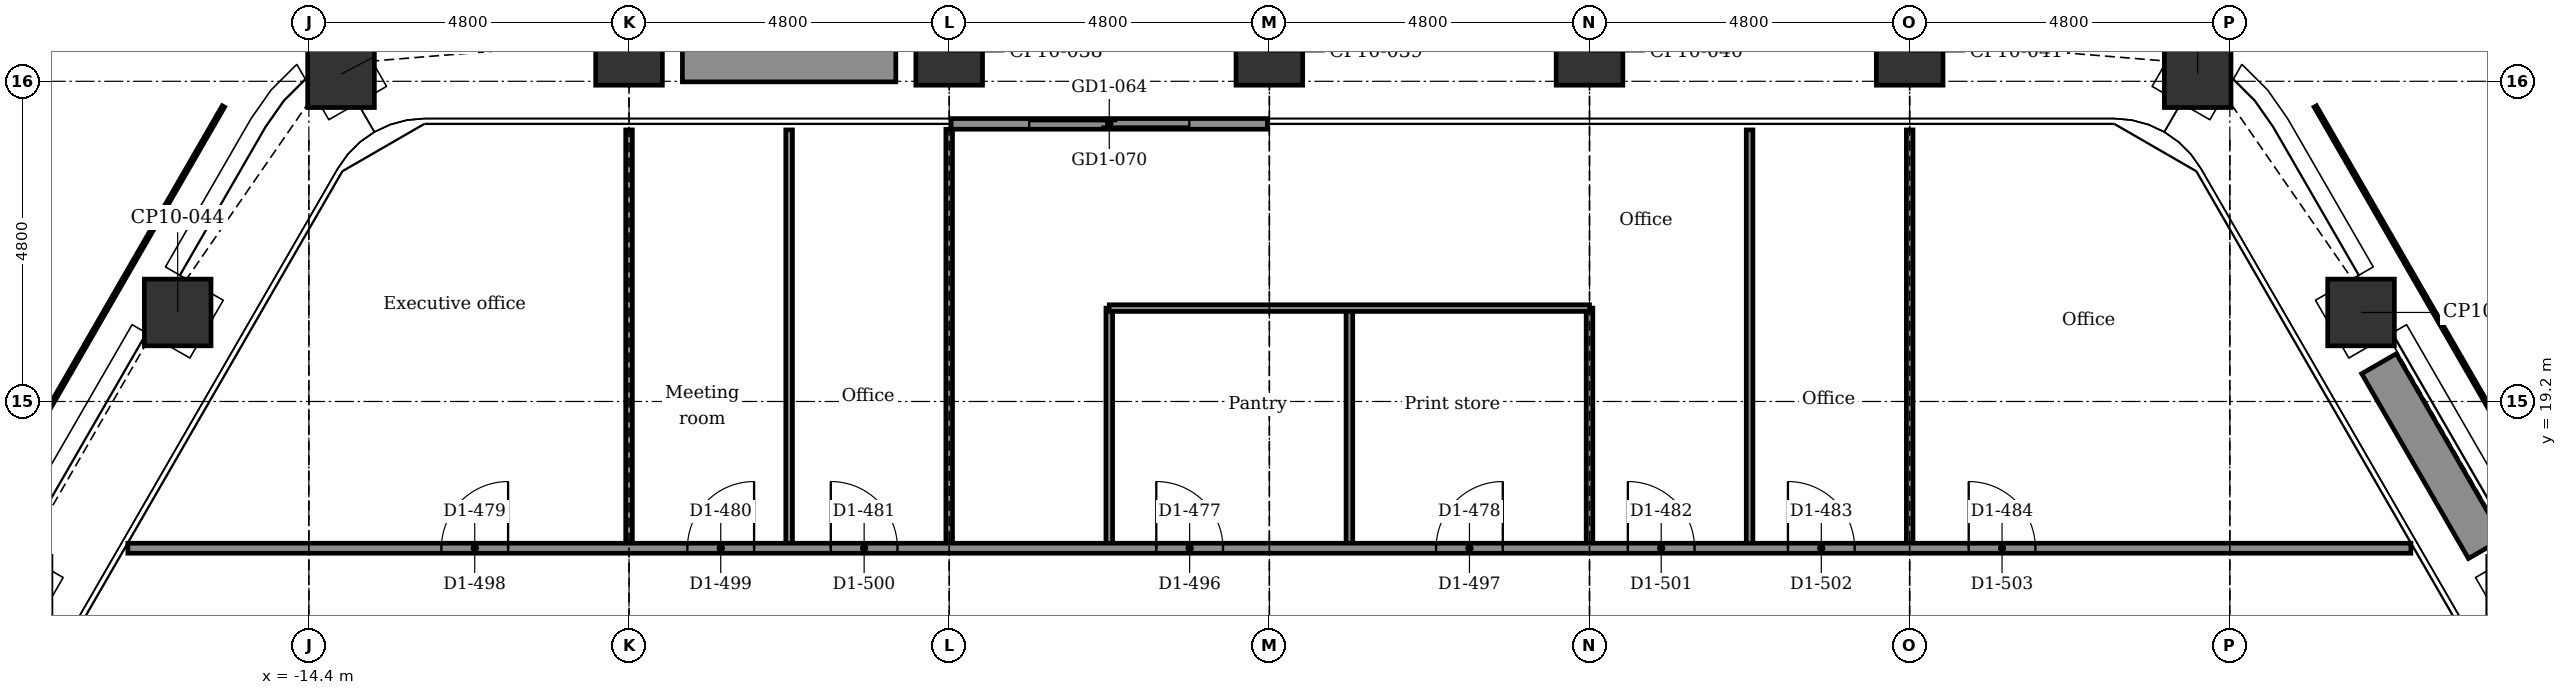
"""IFC4 building model, lengths in metres.
Left out: names, types, materials, properties, quantities, classifications, styles, units other than length and angle.
Written with IfcOpenShell. Run it as: python <this file> out.ifc"""

import sys

from ifc_helpers import new_model, si_unit, direction, frame, frame_2d, origin, origin_2d, place, context, subcontext, project, spatial, rectangle, extrude, element, fill, save


model = new_model("IFC4")
c1 = context("Model", 3, precision=1e-05, world=origin(), true_north=direction((0.0, 1.0)))
c2 = subcontext(c1, "Body", "Model", "MODEL_VIEW")
j1 = project(units=[si_unit("LENGTHUNIT", "METRE"), si_unit("PLANEANGLEUNIT", "RADIAN")], contexts=[c1])
p1 = place(None, origin())
s1 = spatial("IfcSite", under=j1, at=p1, CompositionType="ELEMENT")
p2 = place(p1, origin())
s2 = spatial("IfcBuilding", under=s1, at=p2, CompositionType="ELEMENT")
p3 = place(p2, frame((0.0, 0.0, 170.0)))
s3 = spatial("IfcBuildingStorey", under=s2, at=p3, CompositionType="ELEMENT", Elevation=170.0)
for number, where, z_axis, x_axis in (
    (1, (-13.918, 24.107, -0.15), (0.0, 0.0, 1.0), (0.866, 0.5, 0.0)),
    (2, (-9.6, 24.442, -0.15), (0.0, 0.0, 1.0), (1.0, 0.0, 0.0)),
    (3, (-4.8, 24.442, -0.15), (0.0, 0.0, 1.0), (1.0, 0.0, 0.0)),
    (4, (0.0, 24.442, -0.15), (0.0, 0.0, 1.0), (1.0, 0.0, 0.0)),
    (5, (4.8, 24.442, -0.15), (0.0, 0.0, 1.0), (1.0, 0.0, 0.0)),
    (6, (9.6, 24.442, -0.15), (0.0, 0.0, 1.0), (1.0, 0.0, 0.0)),
    (7, (13.918, 24.107, -0.15), (0.0, 0.0, 1.0), (0.5, 0.866, 0.0)),
    (8, (16.367, 20.535, -0.15), (0.0, 0.0, 1.0), (0.866, 0.5, 0.0)),
    (9, (18.767, 16.378, -0.15), (0.0, 0.0, 1.0), (0.866, 0.5, 0.0)),
    (10, (-18.767, 16.378, -0.15), (0.0, 0.0, 1.0), (0.5, 0.866, 0.0)),
    (11, (-16.367, 20.535, -0.15), (0.0, 0.0, 1.0), (0.5, 0.866, 0.0)),
):
    element("IfcColumn", number, at=place(p3, frame(where, z_axis=z_axis, x_axis=x_axis)), inside=s3, PredefinedType="COLUMN", context=c2, shape_type="SweptSolid", body=[
        extrude(rectangle(XDim=1.0, YDim=1.0, at=origin_2d()), origin(), (0.0, 0.0, 1.0), 3.9),
    ])
p4 = place(p3, frame((-4.77, 23.362, 0.0), z_axis=(0.0, 0.0, 1.0), x_axis=(1.0, 0.0, 0.0)))
e12 = element("IfcWall", 12, at=p4, inside=s3, PredefinedType="PARTITIONING", context=c2, shape_type="SweptSolid", body=[
    extrude(rectangle(XDim=4.74, YDim=0.16, at=frame_2d((2.37, 0.0))), origin(), (0.0, 0.0, 1.0), 3.75),
])
p5 = place(p4, frame((1.17, 0.0, 0.0)))
e13 = element("IfcOpeningElement", 13, at=p5, cuts=e12, PredefinedType="OPENING", context=c2, shape_type="SweptSolid", body=[
    extrude(rectangle(XDim=2.4, YDim=2.4, at=frame_2d((1.2, 1.2))), frame((0.0, 0.09, 0.0), z_axis=(0.0, -1.0, 0.0), x_axis=(1.0, 0.0, 0.0)), (0.0, 0.0, 1.0), 0.18),
])
for number, where, z_axis, x_axis in (
    (14, (-8.8, 24.292, 0.0), (0.0, 0.0, 1.0), (1.0, 0.0, 0.0)),
    (15, (16.637, 19.767, 0.0), (0.0, 0.0, 1.0), (0.5, -0.866, 0.0)),
):
    element("IfcWall", number, at=place(p3, frame(where, z_axis=z_axis, x_axis=x_axis)), inside=s3, PredefinedType="USERDEFINED", context=c2, shape_type="SweptSolid", body=[
        extrude(rectangle(XDim=3.2, YDim=0.6, at=frame_2d((1.6, 0.0))), origin(), (0.0, 0.0, 1.0), 0.7),
    ])
p6 = place(p3, frame((9.6, 17.0, 0.0), z_axis=(0.0, 0.0, 1.0), x_axis=(0.0, 1.0, 0.0)))
e16 = element("IfcWall", 16, at=p6, inside=s3, PredefinedType="PARTITIONING", context=c2, shape_type="SweptSolid", body=[
    extrude(rectangle(XDim=6.271, YDim=0.1, at=frame_2d((3.136, 0.0))), origin(), (0.0, 0.0, 1.0), 3.066),
])
p7 = place(p3, frame((7.2, 17.0, 0.0), z_axis=(0.0, 0.0, 1.0), x_axis=(0.0, 1.0, 0.0)))
e17 = element("IfcWall", 17, at=p7, inside=s3, PredefinedType="PARTITIONING", context=c2, shape_type="SweptSolid", body=[
    extrude(rectangle(XDim=6.271, YDim=0.1, at=frame_2d((3.136, 0.0))), origin(), (0.0, 0.0, 1.0), 3.75),
])
p8 = place(p3, frame((4.8, 17.0, 0.0), z_axis=(0.0, 0.0, 1.0), x_axis=(0.0, 1.0, 0.0)))
e18 = element("IfcWall", 18, at=p8, inside=s3, PredefinedType="PARTITIONING", context=c2, shape_type="SweptSolid", body=[
    extrude(rectangle(XDim=3.6, YDim=0.1, at=frame_2d((1.8, 0.0))), origin(), (0.0, 0.0, 1.0), 3.066),
])
for number, where, z_axis, x_axis in (
    (19, (1.2, 17.0, 0.0), (0.0, 0.0, 1.0), (0.0, 1.0, 0.0)),
    (20, (-2.4, 17.0, 0.0), (0.0, 0.0, 1.0), (0.0, 1.0, 0.0)),
):
    element("IfcWall", number, at=place(p3, frame(where, z_axis=z_axis, x_axis=x_axis)), inside=s3, PredefinedType="PARTITIONING", context=c2, shape_type="SweptSolid", body=[
        extrude(rectangle(XDim=3.6, YDim=0.1, at=frame_2d((1.8, 0.0))), origin(), (0.0, 0.0, 1.0), 3.75),
    ])
p9 = place(p3, frame((-4.8, 17.0, 0.0), z_axis=(0.0, 0.0, 1.0), x_axis=(0.0, 1.0, 0.0)))
e21 = element("IfcWall", 21, at=p9, inside=s3, PredefinedType="PARTITIONING", context=c2, shape_type="SweptSolid", body=[
    extrude(rectangle(XDim=6.281, YDim=0.1, at=frame_2d((3.141, 0.0))), origin(), (0.0, 0.0, 1.0), 3.066),
])
p10 = place(p3, frame((-7.2, 17.0, 0.0), z_axis=(0.0, 0.0, 1.0), x_axis=(0.0, 1.0, 0.0)))
e22 = element("IfcWall", 22, at=p10, inside=s3, PredefinedType="PARTITIONING", context=c2, shape_type="SweptSolid", body=[
    extrude(rectangle(XDim=6.271, YDim=0.1, at=frame_2d((3.136, 0.0))), origin(), (0.0, 0.0, 1.0), 3.75),
])
p11 = place(p3, frame((-9.6, 17.0, 0.0), z_axis=(0.0, 0.0, 1.0), x_axis=(0.0, 1.0, 0.0)))
e23 = element("IfcWall", 23, at=p11, inside=s3, PredefinedType="PARTITIONING", context=c2, shape_type="SweptSolid", body=[
    extrude(rectangle(XDim=6.271, YDim=0.1, at=frame_2d((3.136, 0.0))), origin(), (0.0, 0.0, 1.0), 3.066),
])
p12 = place(p3, frame((-17.115, 17.0, 0.0), z_axis=(0.0, 0.0, 1.0), x_axis=(1.0, 0.0, 0.0)))
e24 = element("IfcWall", 24, at=p12, inside=s3, PredefinedType="PARTITIONING", context=c2, shape_type="SweptSolid", body=[
    extrude(rectangle(XDim=34.229, YDim=0.15, at=frame_2d((17.115, 0.0))), origin(), (0.0, 0.0, 1.0), 3.75),
])
p13 = place(p12, frame((15.419, 0.0, 0.0)))
e25 = element("IfcOpeningElement", 25, at=p13, cuts=e24, PredefinedType="OPENING", context=c2, shape_type="SweptSolid", body=[
    extrude(rectangle(XDim=1.0, YDim=2.1, at=frame_2d((0.5, 1.05))), frame((0.0, 0.085, 0.0), z_axis=(0.0, -1.0, 0.0), x_axis=(1.0, 0.0, 0.0)), (0.0, 0.0, 1.0), 0.17),
])
p14 = place(p12, frame((19.615, 0.0, 0.0)))
e26 = element("IfcOpeningElement", 26, at=p14, cuts=e24, PredefinedType="OPENING", context=c2, shape_type="SweptSolid", body=[
    extrude(rectangle(XDim=1.0, YDim=2.1, at=frame_2d((0.5, 1.05))), frame((0.0, 0.085, 0.0), z_axis=(0.0, -1.0, 0.0), x_axis=(1.0, 0.0, 0.0)), (0.0, 0.0, 1.0), 0.17),
])
p15 = place(p12, frame((4.701, 0.0, 0.0)))
e27 = element("IfcOpeningElement", 27, at=p15, cuts=e24, PredefinedType="OPENING", context=c2, shape_type="SweptSolid", body=[
    extrude(rectangle(XDim=1.0, YDim=2.1, at=frame_2d((0.5, 1.05))), frame((0.0, 0.085, 0.0), z_axis=(0.0, -1.0, 0.0), x_axis=(1.0, 0.0, 0.0)), (0.0, 0.0, 1.0), 0.17),
])
p16 = place(p12, frame((8.389, 0.0, 0.0)))
e28 = element("IfcOpeningElement", 28, at=p16, cuts=e24, PredefinedType="OPENING", context=c2, shape_type="SweptSolid", body=[
    extrude(rectangle(XDim=1.0, YDim=2.1, at=frame_2d((0.5, 1.05))), frame((0.0, 0.085, 0.0), z_axis=(0.0, -1.0, 0.0), x_axis=(1.0, 0.0, 0.0)), (0.0, 0.0, 1.0), 0.17),
])
p17 = place(p12, frame((10.539, 0.0, 0.0)))
e29 = element("IfcOpeningElement", 29, at=p17, cuts=e24, PredefinedType="OPENING", context=c2, shape_type="SweptSolid", body=[
    extrude(rectangle(XDim=1.0, YDim=2.1, at=frame_2d((0.5, 1.05))), frame((0.0, 0.085, 0.0), z_axis=(0.0, -1.0, 0.0), x_axis=(1.0, 0.0, 0.0)), (0.0, 0.0, 1.0), 0.17),
])
p18 = place(p12, frame((22.49, 0.0, 0.0)))
e30 = element("IfcOpeningElement", 30, at=p18, cuts=e24, PredefinedType="OPENING", context=c2, shape_type="SweptSolid", body=[
    extrude(rectangle(XDim=1.0, YDim=2.1, at=frame_2d((0.5, 1.05))), frame((0.0, 0.085, 0.0), z_axis=(0.0, -1.0, 0.0), x_axis=(1.0, 0.0, 0.0)), (0.0, 0.0, 1.0), 0.17),
])
p19 = place(p12, frame((24.889, 0.0, 0.0)))
e31 = element("IfcOpeningElement", 31, at=p19, cuts=e24, PredefinedType="OPENING", context=c2, shape_type="SweptSolid", body=[
    extrude(rectangle(XDim=1.0, YDim=2.1, at=frame_2d((0.5, 1.05))), frame((0.0, 0.085, 0.0), z_axis=(0.0, -1.0, 0.0), x_axis=(1.0, 0.0, 0.0)), (0.0, 0.0, 1.0), 0.17),
])
p20 = place(p12, frame((27.599, 0.0, 0.0)))
e32 = element("IfcOpeningElement", 32, at=p20, cuts=e24, PredefinedType="OPENING", context=c2, shape_type="SweptSolid", body=[
    extrude(rectangle(XDim=1.0, YDim=2.1, at=frame_2d((0.5, 1.05))), frame((0.0, 0.085, 0.0), z_axis=(0.0, -1.0, 0.0), x_axis=(1.0, 0.0, 0.0)), (0.0, 0.0, 1.0), 0.17),
])
p21 = place(p3, frame((-2.4, 20.6, 0.0), z_axis=(0.0, 0.0, 1.0), x_axis=(1.0, 0.0, 0.0)))
e33 = element("IfcWall", 33, at=p21, inside=s3, PredefinedType="PARTITIONING", context=c2, shape_type="SweptSolid", body=[
    extrude(rectangle(XDim=7.2, YDim=0.1, at=frame_2d((3.6, 0.0))), origin(), (0.0, 0.0, 1.0), 3.75),
])
p22 = place(p5, origin())
e34 = element("IfcDoor", 34, at=p22, inside=s3, OperationType="DOUBLE_DOOR_SLIDING", PredefinedType="DOOR", context=c2, shape_type="SweptSolid", body=[
    extrude(rectangle(XDim=2.4, YDim=2.4, at=frame_2d((1.2, 1.2))), frame((0.0, 0.025, 0.0), z_axis=(0.0, -1.0, 0.0), x_axis=(1.0, 0.0, 0.0)), (0.0, 0.0, 1.0), 0.05),
])
fill(e13, e34)
p23 = place(p13, origin())
e35 = element("IfcDoor", 35, at=p23, inside=s3, OperationType="SINGLE_SWING_LEFT", PredefinedType="DOOR", context=c2, shape_type="SweptSolid", body=[
    extrude(rectangle(XDim=1.0, YDim=2.1, at=frame_2d((0.5, 1.05))), frame((0.0, 0.025, 0.0), z_axis=(0.0, -1.0, 0.0), x_axis=(1.0, 0.0, 0.0)), (0.0, 0.0, 1.0), 0.05),
])
fill(e25, e35)
p24 = place(p14, origin())
e36 = element("IfcDoor", 36, at=p24, inside=s3, OperationType="SINGLE_SWING_RIGHT", PredefinedType="DOOR", context=c2, shape_type="SweptSolid", body=[
    extrude(rectangle(XDim=1.0, YDim=2.1, at=frame_2d((0.5, 1.05))), frame((0.0, 0.025, 0.0), z_axis=(0.0, -1.0, 0.0), x_axis=(1.0, 0.0, 0.0)), (0.0, 0.0, 1.0), 0.05),
])
fill(e26, e36)
p25 = place(p15, origin())
e37 = element("IfcDoor", 37, at=p25, inside=s3, OperationType="SINGLE_SWING_RIGHT", PredefinedType="DOOR", context=c2, shape_type="SweptSolid", body=[
    extrude(rectangle(XDim=1.0, YDim=2.1, at=frame_2d((0.5, 1.05))), frame((0.0, 0.025, 0.0), z_axis=(0.0, -1.0, 0.0), x_axis=(1.0, 0.0, 0.0)), (0.0, 0.0, 1.0), 0.05),
])
fill(e27, e37)
p26 = place(p16, origin())
e38 = element("IfcDoor", 38, at=p26, inside=s3, OperationType="SINGLE_SWING_RIGHT", PredefinedType="DOOR", context=c2, shape_type="SweptSolid", body=[
    extrude(rectangle(XDim=1.0, YDim=2.1, at=frame_2d((0.5, 1.05))), frame((0.0, 0.025, 0.0), z_axis=(0.0, -1.0, 0.0), x_axis=(1.0, 0.0, 0.0)), (0.0, 0.0, 1.0), 0.05),
])
fill(e28, e38)
p27 = place(p17, origin())
e39 = element("IfcDoor", 39, at=p27, inside=s3, OperationType="SINGLE_SWING_LEFT", PredefinedType="DOOR", context=c2, shape_type="SweptSolid", body=[
    extrude(rectangle(XDim=1.0, YDim=2.1, at=frame_2d((0.5, 1.05))), frame((0.0, 0.025, 0.0), z_axis=(0.0, -1.0, 0.0), x_axis=(1.0, 0.0, 0.0)), (0.0, 0.0, 1.0), 0.05),
])
fill(e29, e39)
p28 = place(p18, origin())
e40 = element("IfcDoor", 40, at=p28, inside=s3, OperationType="SINGLE_SWING_LEFT", PredefinedType="DOOR", context=c2, shape_type="SweptSolid", body=[
    extrude(rectangle(XDim=1.0, YDim=2.1, at=frame_2d((0.5, 1.05))), frame((0.0, 0.025, 0.0), z_axis=(0.0, -1.0, 0.0), x_axis=(1.0, 0.0, 0.0)), (0.0, 0.0, 1.0), 0.05),
])
fill(e30, e40)
p29 = place(p19, origin())
e41 = element("IfcDoor", 41, at=p29, inside=s3, OperationType="SINGLE_SWING_LEFT", PredefinedType="DOOR", context=c2, shape_type="SweptSolid", body=[
    extrude(rectangle(XDim=1.0, YDim=2.1, at=frame_2d((0.5, 1.05))), frame((0.0, 0.025, 0.0), z_axis=(0.0, -1.0, 0.0), x_axis=(1.0, 0.0, 0.0)), (0.0, 0.0, 1.0), 0.05),
])
fill(e31, e41)
p30 = place(p20, origin())
e42 = element("IfcDoor", 42, at=p30, inside=s3, OperationType="SINGLE_SWING_LEFT", PredefinedType="DOOR", context=c2, shape_type="SweptSolid", body=[
    extrude(rectangle(XDim=1.0, YDim=2.1, at=frame_2d((0.5, 1.05))), frame((0.0, 0.025, 0.0), z_axis=(0.0, -1.0, 0.0), x_axis=(1.0, 0.0, 0.0)), (0.0, 0.0, 1.0), 0.05),
])
fill(e32, e42)
save(model, sys.argv[1])
